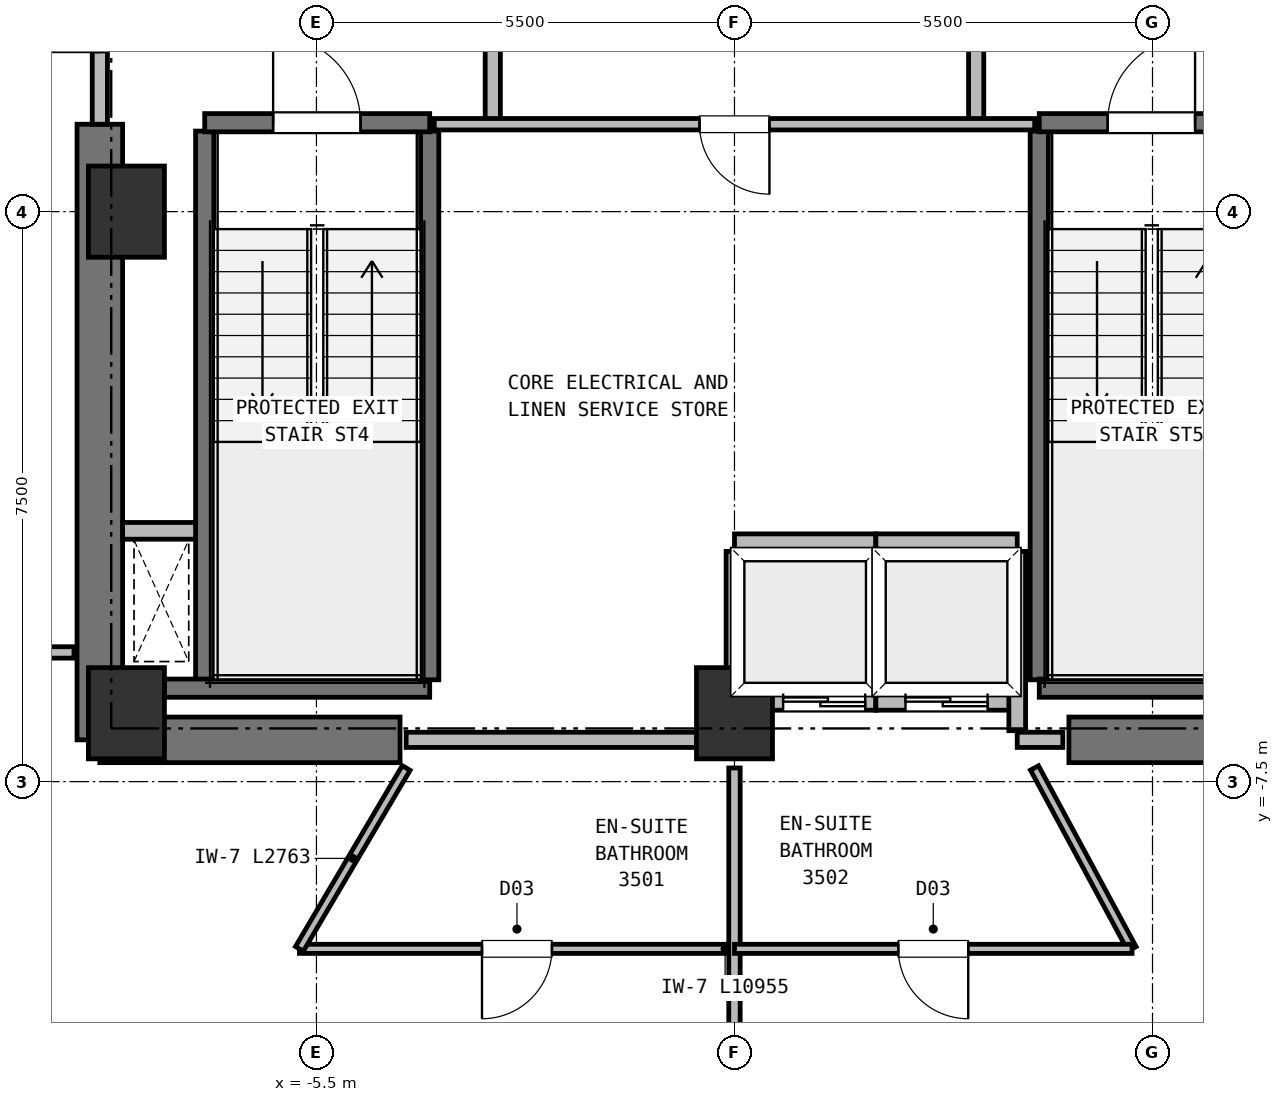
"""IFC4 building model, lengths in metres.
Left out: names, types, materials, properties, quantities, classifications, styles, units other than length and angle.
Written with IfcOpenShell. Run it as: python <this file> out.ifc"""

import sys

from ifc_helpers import new_model, si_unit, direction, frame, frame_2d, origin, origin_2d, place, context, subcontext, project, spatial, rectangle, extrude, element, fill, save


model = new_model("IFC4")
c1 = context("Model", 3, precision=1e-05, world=origin(), true_north=direction((0.0, 1.0)))
c2 = subcontext(c1, "Body", "Model", "MODEL_VIEW")
j1 = project(units=[si_unit("LENGTHUNIT", "METRE"), si_unit("PLANEANGLEUNIT", "RADIAN")], contexts=[c1])
p1 = place(None, origin())
s1 = spatial("IfcSite", under=j1, at=p1, CompositionType="ELEMENT")
p2 = place(p1, origin())
s2 = spatial("IfcBuilding", under=s1, at=p2, CompositionType="ELEMENT")
p3 = place(p2, frame((0.0, 0.0, 131.0)))
s3 = spatial("IfcBuildingStorey", under=s2, at=p3, CompositionType="ELEMENT", Elevation=131.0)
for number, where, z_axis, x_axis in (
    (1, (-8.0, -6.6, 0.0), (0.0, 0.0, 1.0), (1.0, 0.0, 0.0)),
    (2, (0.0, -6.6, 0.0), (0.0, 0.0, 1.0), (1.0, 0.0, 0.0)),
    (3, (-8.0, 0.0, 0.0), (0.0, 0.0, 1.0), (1.0, 0.0, 0.0)),
):
    element("IfcColumn", number, at=place(p3, frame(where, z_axis=z_axis, x_axis=x_axis)), inside=s3, PredefinedType="COLUMN", context=c2, shape_type="SweptSolid", body=[
        extrude(rectangle(XDim=1.0, YDim=1.2, at=origin_2d()), origin(), (0.0, 0.0, 1.0), 3.75),
    ])
for number, where, z_axis, x_axis in (
    (4, (-8.35, -6.95, 0.0), (0.0, 0.0, 1.0), (1.0, 0.0, 0.0)),
    (5, (4.4, -6.95, 0.0), (0.0, 0.0, 1.0), (1.0, 0.0, 0.0)),
):
    element("IfcWall", number, at=place(p3, frame(where, z_axis=z_axis, x_axis=x_axis)), inside=s3, PredefinedType="SHEAR", context=c2, shape_type="SweptSolid", body=[
        extrude(rectangle(XDim=3.95, YDim=0.6, at=frame_2d((1.975, 0.0))), origin(), (0.0, 0.0, 1.0), 3.5),
    ])
p4 = place(p3, frame((-8.35, -6.95, 0.0), z_axis=(0.0, 0.0, 1.0), x_axis=(0.0, 1.0, 0.0)))
e6 = element("IfcWall", 6, at=p4, inside=s3, PredefinedType="SHEAR", context=c2, shape_type="SweptSolid", body=[
    extrude(rectangle(XDim=8.1, YDim=0.6, at=frame_2d((4.05, 0.0))), origin(), (0.0, 0.0, 1.0), 3.5),
])
p5 = place(p3, frame((-6.97, -6.16, 0.0), z_axis=(0.0, 0.0, 1.0), x_axis=(0.0, 1.0, 0.0)))
e7 = element("IfcWall", 7, at=p5, inside=s3, PredefinedType="SHEAR", context=c2, shape_type="SweptSolid", body=[
    extrude(rectangle(XDim=7.22, YDim=0.24, at=frame_2d((3.61, 0.0))), origin(), (0.0, 0.0, 1.0), 3.5),
])
p6 = place(p3, frame((-7.5, -6.27, 0.0), z_axis=(0.0, 0.0, 1.0), x_axis=(1.0, 0.0, 0.0)))
e8 = element("IfcWall", 8, at=p6, inside=s3, PredefinedType="SHEAR", context=c2, shape_type="SweptSolid", body=[
    extrude(rectangle(XDim=3.49, YDim=0.24, at=frame_2d((1.745, 0.0))), origin(), (0.0, 0.0, 1.0), 3.5),
])
p7 = place(p3, frame((-4.01, -6.16, 0.0), z_axis=(0.0, 0.0, 1.0), x_axis=(0.0, 1.0, 0.0)))
e9 = element("IfcWall", 9, at=p7, inside=s3, PredefinedType="SHEAR", context=c2, shape_type="SweptSolid", body=[
    extrude(rectangle(XDim=7.22, YDim=0.24, at=frame_2d((3.61, 0.0))), origin(), (0.0, 0.0, 1.0), 3.5),
])
p8 = place(p3, frame((-6.97, 1.17, 0.0), z_axis=(0.0, 0.0, 1.0), x_axis=(1.0, 0.0, 0.0)))
e10 = element("IfcWall", 10, at=p8, inside=s3, PredefinedType="SHEAR", context=c2, shape_type="SweptSolid", body=[
    extrude(rectangle(XDim=2.96, YDim=0.24, at=frame_2d((1.48, 0.0))), origin(), (0.0, 0.0, 1.0), 3.5),
])
p9 = place(p8, frame((0.9, 0.0, 0.0)))
e11 = element("IfcOpeningElement", 11, at=p9, cuts=e10, PredefinedType="OPENING", context=c2, shape_type="SweptSolid", body=[
    extrude(rectangle(XDim=1.15, YDim=2.15, at=frame_2d((0.575, 1.075))), frame((0.0, 0.13, 0.0), z_axis=(0.0, -1.0, 0.0), x_axis=(1.0, 0.0, 0.0)), (0.0, 0.0, 1.0), 0.26),
])
p10 = place(p3, frame((4.01, -6.16, 0.0), z_axis=(0.0, 0.0, 1.0), x_axis=(0.0, 1.0, 0.0)))
e12 = element("IfcWall", 12, at=p10, inside=s3, PredefinedType="SHEAR", context=c2, shape_type="SweptSolid", body=[
    extrude(rectangle(XDim=7.22, YDim=0.24, at=frame_2d((3.61, 0.0))), origin(), (0.0, 0.0, 1.0), 3.5),
])
p11 = place(p3, frame((4.01, -6.27, 0.0), z_axis=(0.0, 0.0, 1.0), x_axis=(1.0, 0.0, 0.0)))
e13 = element("IfcWall", 13, at=p11, inside=s3, PredefinedType="SHEAR", context=c2, shape_type="SweptSolid", body=[
    extrude(rectangle(XDim=3.49, YDim=0.24, at=frame_2d((1.745, 0.0))), origin(), (0.0, 0.0, 1.0), 3.5),
])
p12 = place(p3, frame((4.01, 1.17, 0.0), z_axis=(0.0, 0.0, 1.0), x_axis=(1.0, 0.0, 0.0)))
e14 = element("IfcWall", 14, at=p12, inside=s3, PredefinedType="SHEAR", context=c2, shape_type="SweptSolid", body=[
    extrude(rectangle(XDim=2.96, YDim=0.24, at=frame_2d((1.48, 0.0))), origin(), (0.0, 0.0, 1.0), 3.5),
])
p13 = place(p12, frame((0.9, 0.0, 0.0)))
e15 = element("IfcOpeningElement", 15, at=p13, cuts=e14, PredefinedType="OPENING", context=c2, shape_type="SweptSolid", body=[
    extrude(rectangle(XDim=1.15, YDim=2.15, at=frame_2d((0.575, 1.075))), frame((0.0, 0.13, 0.0), z_axis=(0.0, -1.0, 0.0), x_axis=(1.0, 0.0, 0.0)), (0.0, 0.0, 1.0), 0.26),
])
p14 = place(p3, frame((-8.05, -4.2, 0.0), z_axis=(0.0, 0.0, 1.0), x_axis=(1.0, 0.0, 0.0)))
e16 = element("IfcWall", 16, at=p14, inside=s3, PredefinedType="PARTITIONING", context=c2, shape_type="SweptSolid", body=[
    extrude(rectangle(XDim=0.96, YDim=0.22, at=frame_2d((0.48, 0.0))), origin(), (0.0, 0.0, 1.0), 3.5),
])
p15 = place(p3, frame((0.0, -6.45, 0.0), z_axis=(0.0, 0.0, 1.0), x_axis=(1.0, 0.0, 0.0)))
e17 = element("IfcWall", 17, at=p15, inside=s3, PredefinedType="PARTITIONING", context=c2, shape_type="SweptSolid", body=[
    extrude(rectangle(XDim=1.86, YDim=0.22, at=frame_2d((0.93, 0.0))), origin(), (0.0, 0.0, 1.0), 3.12),
])
p16 = place(p15, frame((0.64, 0.0, 0.0)))
e18 = element("IfcOpeningElement", 18, at=p16, cuts=e17, PredefinedType="OPENING", context=c2, shape_type="SweptSolid", body=[
    extrude(rectangle(XDim=1.08, YDim=2.15, at=frame_2d((0.54, 1.075))), frame((0.0, 0.12, 0.0), z_axis=(0.0, -1.0, 0.0), x_axis=(1.0, 0.0, 0.0)), (0.0, 0.0, 1.0), 0.24),
])
for number, where, z_axis, x_axis in (
    (19, (0.0, -4.35, 0.0), (0.0, 0.0, 1.0), (1.0, 0.0, 0.0)),
    (20, (0.0, -6.33, 0.0), (0.0, 0.0, 1.0), (0.0, 1.0, 0.0)),
    (21, (1.86, -6.33, 0.0), (0.0, 0.0, 1.0), (0.0, 1.0, 0.0)),
):
    element("IfcWall", number, at=place(p3, frame(where, z_axis=z_axis, x_axis=x_axis)), inside=s3, PredefinedType="PARTITIONING", context=c2, shape_type="SweptSolid", body=[
        extrude(rectangle(XDim=1.86, YDim=0.22, at=frame_2d((0.93, 0.0))), origin(), (0.0, 0.0, 1.0), 3.5),
    ])
p17 = place(p3, frame((1.86, -6.45, 0.0), z_axis=(0.0, 0.0, 1.0), x_axis=(1.0, 0.0, 0.0)))
e22 = element("IfcWall", 22, at=p17, inside=s3, PredefinedType="PARTITIONING", context=c2, shape_type="SweptSolid", body=[
    extrude(rectangle(XDim=1.86, YDim=0.22, at=frame_2d((0.93, 0.0))), origin(), (0.0, 0.0, 1.0), 3.12),
])
p18 = place(p17, frame((0.39, 0.0, 0.0)))
e23 = element("IfcOpeningElement", 23, at=p18, cuts=e22, PredefinedType="OPENING", context=c2, shape_type="SweptSolid", body=[
    extrude(rectangle(XDim=1.08, YDim=2.15, at=frame_2d((0.54, 1.075))), frame((0.0, 0.12, 0.0), z_axis=(0.0, -1.0, 0.0), x_axis=(1.0, 0.0, 0.0)), (0.0, 0.0, 1.0), 0.24),
])
p19 = place(p3, frame((1.86, -4.35, 0.0), z_axis=(0.0, 0.0, 1.0), x_axis=(1.0, 0.0, 0.0)))
e24 = element("IfcWall", 24, at=p19, inside=s3, PredefinedType="PARTITIONING", context=c2, shape_type="SweptSolid", body=[
    extrude(rectangle(XDim=1.86, YDim=0.22, at=frame_2d((0.93, 0.0))), origin(), (0.0, 0.0, 1.0), 3.5),
])
p20 = place(p3, frame((3.72, -6.83, 0.0), z_axis=(0.0, 0.0, 1.0), x_axis=(0.0, 1.0, 0.0)))
e25 = element("IfcWall", 25, at=p20, inside=s3, PredefinedType="PARTITIONING", context=c2, shape_type="SweptSolid", body=[
    extrude(rectangle(XDim=2.36, YDim=0.22, at=frame_2d((1.18, 0.0))), origin(), (0.0, 0.0, 1.0), 3.5),
])
p21 = place(p3, frame((-3.18, 1.15, 0.0), z_axis=(0.0, 0.0, 1.0), x_axis=(0.0, 1.0, 0.0)))
e26 = element("IfcWall", 26, at=p21, inside=s3, PredefinedType="PARTITIONING", context=c2, shape_type="SweptSolid", body=[
    extrude(rectangle(XDim=3.3, YDim=0.2, at=frame_2d((1.65, 0.0))), origin(), (0.0, 0.0, 1.0), 3.5),
])
p22 = place(p21, frame((1.08, 0.0, 0.0)))
e27 = element("IfcOpeningElement", 27, at=p22, cuts=e26, PredefinedType="OPENING", context=c2, shape_type="SweptSolid", body=[
    extrude(rectangle(XDim=1.15, YDim=2.15, at=frame_2d((0.575, 1.075))), frame((0.0, 0.11, 0.0), z_axis=(0.0, -1.0, 0.0), x_axis=(1.0, 0.0, 0.0)), (0.0, 0.0, 1.0), 0.22),
])
p23 = place(p3, frame((3.18, 1.15, 0.0), z_axis=(0.0, 0.0, 1.0), x_axis=(0.0, 1.0, 0.0)))
e28 = element("IfcWall", 28, at=p23, inside=s3, PredefinedType="PARTITIONING", context=c2, shape_type="SweptSolid", body=[
    extrude(rectangle(XDim=3.3, YDim=0.2, at=frame_2d((1.65, 0.0))), origin(), (0.0, 0.0, 1.0), 3.5),
])
p24 = place(p23, frame((1.08, 0.0, 0.0)))
e29 = element("IfcOpeningElement", 29, at=p24, cuts=e28, PredefinedType="OPENING", context=c2, shape_type="SweptSolid", body=[
    extrude(rectangle(XDim=1.15, YDim=2.15, at=frame_2d((0.575, 1.075))), frame((0.0, 0.11, 0.0), z_axis=(0.0, -1.0, 0.0), x_axis=(1.0, 0.0, 0.0)), (0.0, 0.0, 1.0), 0.22),
])
p25 = place(p3, frame((-8.35, 1.15, 0.0), z_axis=(0.0, 0.0, 1.0), x_axis=(0.0, 1.0, 0.0)))
e30 = element("IfcWall", 30, at=p25, inside=s3, PredefinedType="PARTITIONING", context=c2, shape_type="SweptSolid", body=[
    extrude(rectangle(XDim=5.4, YDim=0.2, at=frame_2d((2.7, 0.0))), origin(), (0.0, 0.0, 1.0), 3.5),
])
p26 = place(p25, frame((0.95, 0.0, 0.0)))
e31 = element("IfcOpeningElement", 31, at=p26, cuts=e30, PredefinedType="OPENING", context=c2, shape_type="SweptSolid", body=[
    extrude(rectangle(XDim=1.15, YDim=2.15, at=frame_2d((0.575, 1.075))), frame((0.0, 0.11, 0.0), z_axis=(0.0, -1.0, 0.0), x_axis=(1.0, 0.0, 0.0)), (0.0, 0.0, 1.0), 0.22),
])
p27 = place(p3, frame((3.95, 1.15, 0.0), z_axis=(0.0, 0.0, 1.0), x_axis=(-1.0, 0.0, 0.0)))
e32 = element("IfcWall", 32, at=p27, inside=s3, PredefinedType="PARTITIONING", context=c2, shape_type="SweptSolid", body=[
    extrude(rectangle(XDim=7.9, YDim=0.15, at=frame_2d((3.95, 0.0))), origin(), (0.0, 0.0, 1.0), 3.5),
])
p28 = place(p27, frame((3.49, 0.0, 0.0)))
e33 = element("IfcOpeningElement", 33, at=p28, cuts=e32, PredefinedType="OPENING", context=c2, shape_type="SweptSolid", body=[
    extrude(rectangle(XDim=0.92, YDim=2.05, at=frame_2d((0.46, 1.025))), frame((0.0, 0.085, 0.0), z_axis=(0.0, -1.0, 0.0), x_axis=(1.0, 0.0, 0.0)), (0.0, 0.0, 1.0), 0.17),
])
p29 = place(p3, frame((-4.32, -6.95, 0.0), z_axis=(0.0, 0.0, 1.0), x_axis=(1.0, 0.0, 0.0)))
e34 = element("IfcWall", 34, at=p29, inside=s3, PredefinedType="PARTITIONING", context=c2, shape_type="SweptSolid", body=[
    extrude(rectangle(XDim=4.32, YDim=0.2, at=frame_2d((2.16, 0.0))), origin(), (0.0, 0.0, 1.0), 3.5),
])
p30 = place(p3, frame((3.72, -6.95, 0.0), z_axis=(0.0, 0.0, 1.0), x_axis=(1.0, 0.0, 0.0)))
e35 = element("IfcWall", 35, at=p30, inside=s3, PredefinedType="PARTITIONING", context=c2, shape_type="SweptSolid", body=[
    extrude(rectangle(XDim=0.6, YDim=0.2, at=frame_2d((0.3, 0.0))), origin(), (0.0, 0.0, 1.0), 3.5),
])
p31 = place(p3, frame((-8.69, -5.8, 0.0), z_axis=(0.0, 0.0, 1.0), x_axis=(-1.0, 0.0, 0.0)))
e36 = element("IfcWall", 36, at=p31, inside=s3, PredefinedType="PARTITIONING", context=c2, shape_type="SweptSolid", body=[
    extrude(rectangle(XDim=2.02, YDim=0.15, at=frame_2d((1.01, 0.0))), origin(), (0.0, 0.0, 1.0), 3.5),
])
p32 = place(p31, frame((0.52, 0.0, 0.0)))
e37 = element("IfcOpeningElement", 37, at=p32, cuts=e36, PredefinedType="OPENING", context=c2, shape_type="SweptSolid", body=[
    extrude(rectangle(XDim=1.06, YDim=2.15, at=frame_2d((0.53, 1.075))), frame((0.0, 0.085, 0.0), z_axis=(0.0, -1.0, 0.0), x_axis=(1.0, 0.0, 0.0)), (0.0, 0.0, 1.0), 0.17),
])
p33 = place(p3, frame((0.0, -9.7, 0.0), z_axis=(0.0, 0.0, 1.0), x_axis=(-1.0, 0.0, 0.0)))
e38 = element("IfcWall", 38, at=p33, inside=s3, PredefinedType="PARTITIONING", context=c2, shape_type="SweptSolid", body=[
    extrude(rectangle(XDim=5.724, YDim=0.12, at=frame_2d((2.862, 0.0))), origin(), (0.0, 0.0, 1.0), 3.5),
])
p34 = place(p33, frame((2.402, 0.0, 0.0)))
e39 = element("IfcOpeningElement", 39, at=p34, cuts=e38, PredefinedType="OPENING", context=c2, shape_type="SweptSolid", body=[
    extrude(rectangle(XDim=0.92, YDim=2.1, at=frame_2d((0.46, 1.05))), frame((0.0, 0.07, 0.0), z_axis=(0.0, -1.0, 0.0), x_axis=(1.0, 0.0, 0.0)), (0.0, 0.0, 1.0), 0.14),
])
p35 = place(p3, frame((-4.319, -7.32, 0.0), z_axis=(0.0, 0.0, 1.0), x_axis=(-0.508258955423, -0.861204292971, 0.0)))
e40 = element("IfcWall", 40, at=p35, inside=s3, PredefinedType="PARTITIONING", context=c2, shape_type="SweptSolid", body=[
    extrude(rectangle(XDim=2.763, YDim=0.12, at=frame_2d((1.382, 0.0))), origin(), (0.0, 0.0, 1.0), 3.5),
])
p36 = place(p3, frame((0.0, -7.32, 0.0), z_axis=(0.0, 0.0, 1.0), x_axis=(0.0, -1.0, 0.0)))
e41 = element("IfcWall", 41, at=p36, inside=s3, PredefinedType="PARTITIONING", context=c2, shape_type="SweptSolid", body=[
    extrude(rectangle(XDim=11.722, YDim=0.15, at=frame_2d((5.861, 0.0))), origin(), (0.0, 0.0, 1.0), 3.5),
])
p37 = place(p3, frame((3.947, -7.32, 0.0), z_axis=(0.0, 0.0, 1.0), x_axis=(0.474665085806, -0.880166493521, 0.0)))
e42 = element("IfcWall", 42, at=p37, inside=s3, PredefinedType="PARTITIONING", context=c2, shape_type="SweptSolid", body=[
    extrude(rectangle(XDim=2.704, YDim=0.12, at=frame_2d((1.352, 0.0))), origin(), (0.0, 0.0, 1.0), 3.5),
])
p38 = place(p3, frame((5.231, -9.7, 0.0), z_axis=(0.0, 0.0, 1.0), x_axis=(-1.0, 0.0, 0.0)))
e43 = element("IfcWall", 43, at=p38, inside=s3, PredefinedType="PARTITIONING", context=c2, shape_type="SweptSolid", body=[
    extrude(rectangle(XDim=5.231, YDim=0.12, at=frame_2d((2.615, 0.0))), origin(), (0.0, 0.0, 1.0), 3.5),
])
p39 = place(p38, frame((2.156, 0.0, 0.0)))
e44 = element("IfcOpeningElement", 44, at=p39, cuts=e43, PredefinedType="OPENING", context=c2, shape_type="SweptSolid", body=[
    extrude(rectangle(XDim=0.92, YDim=2.1, at=frame_2d((0.46, 1.05))), frame((0.0, 0.07, 0.0), z_axis=(0.0, -1.0, 0.0), x_axis=(1.0, 0.0, 0.0)), (0.0, 0.0, 1.0), 0.14),
])
p40 = place(p9, origin())
e45 = element("IfcDoor", 45, at=p40, inside=s3, OperationType="SINGLE_SWING_LEFT", PredefinedType="DOOR", context=c2, shape_type="SweptSolid", body=[
    extrude(rectangle(XDim=1.15, YDim=2.15, at=frame_2d((0.575, 1.075))), frame((0.0, 0.025, 0.0), z_axis=(0.0, -1.0, 0.0), x_axis=(1.0, 0.0, 0.0)), (0.0, 0.0, 1.0), 0.05),
])
fill(e11, e45)
p41 = place(p13, origin())
e46 = element("IfcDoor", 46, at=p41, inside=s3, OperationType="SINGLE_SWING_RIGHT", PredefinedType="DOOR", context=c2, shape_type="SweptSolid", body=[
    extrude(rectangle(XDim=1.15, YDim=2.15, at=frame_2d((0.575, 1.075))), frame((0.0, 0.025, 0.0), z_axis=(0.0, -1.0, 0.0), x_axis=(1.0, 0.0, 0.0)), (0.0, 0.0, 1.0), 0.05),
])
fill(e15, e46)
p42 = place(p16, origin())
e47 = element("IfcDoor", 47, at=p42, inside=s3, OperationType="DOUBLE_DOOR_SLIDING", PredefinedType="DOOR", context=c2, shape_type="SweptSolid", body=[
    extrude(rectangle(XDim=1.08, YDim=2.15, at=frame_2d((0.54, 1.075))), frame((0.0, 0.025, 0.0), z_axis=(0.0, -1.0, 0.0), x_axis=(1.0, 0.0, 0.0)), (0.0, 0.0, 1.0), 0.05),
])
fill(e18, e47)
p43 = place(p18, origin())
e48 = element("IfcDoor", 48, at=p43, inside=s3, OperationType="DOUBLE_DOOR_SLIDING", PredefinedType="DOOR", context=c2, shape_type="SweptSolid", body=[
    extrude(rectangle(XDim=1.08, YDim=2.15, at=frame_2d((0.54, 1.075))), frame((0.0, 0.025, 0.0), z_axis=(0.0, -1.0, 0.0), x_axis=(1.0, 0.0, 0.0)), (0.0, 0.0, 1.0), 0.05),
])
fill(e23, e48)
p44 = place(p26, origin())
e49 = element("IfcDoor", 49, at=p44, inside=s3, OperationType="SINGLE_SWING_LEFT", PredefinedType="DOOR", context=c2, shape_type="SweptSolid", body=[
    extrude(rectangle(XDim=1.15, YDim=2.15, at=frame_2d((0.575, 1.075))), frame((0.0, 0.025, 0.0), z_axis=(0.0, -1.0, 0.0), x_axis=(1.0, 0.0, 0.0)), (0.0, 0.0, 1.0), 0.05),
])
fill(e31, e49)
p45 = place(p28, origin())
e50 = element("IfcDoor", 50, at=p45, inside=s3, OperationType="SINGLE_SWING_LEFT", PredefinedType="DOOR", context=c2, shape_type="SweptSolid", body=[
    extrude(rectangle(XDim=0.92, YDim=2.05, at=frame_2d((0.46, 1.025))), frame((0.0, 0.025, 0.0), z_axis=(0.0, -1.0, 0.0), x_axis=(1.0, 0.0, 0.0)), (0.0, 0.0, 1.0), 0.05),
])
fill(e33, e50)
p46 = place(p34, origin())
e51 = element("IfcDoor", 51, at=p46, inside=s3, OperationType="SINGLE_SWING_RIGHT", PredefinedType="DOOR", context=c2, shape_type="SweptSolid", body=[
    extrude(rectangle(XDim=0.92, YDim=2.1, at=frame_2d((0.46, 1.05))), frame((0.0, 0.025, 0.0), z_axis=(0.0, -1.0, 0.0), x_axis=(1.0, 0.0, 0.0)), (0.0, 0.0, 1.0), 0.05),
])
fill(e39, e51)
p47 = place(p39, origin())
e52 = element("IfcDoor", 52, at=p47, inside=s3, OperationType="SINGLE_SWING_LEFT", PredefinedType="DOOR", context=c2, shape_type="SweptSolid", body=[
    extrude(rectangle(XDim=0.92, YDim=2.1, at=frame_2d((0.46, 1.05))), frame((0.0, 0.025, 0.0), z_axis=(0.0, -1.0, 0.0), x_axis=(1.0, 0.0, 0.0)), (0.0, 0.0, 1.0), 0.05),
])
fill(e44, e52)
save(model, sys.argv[1])
